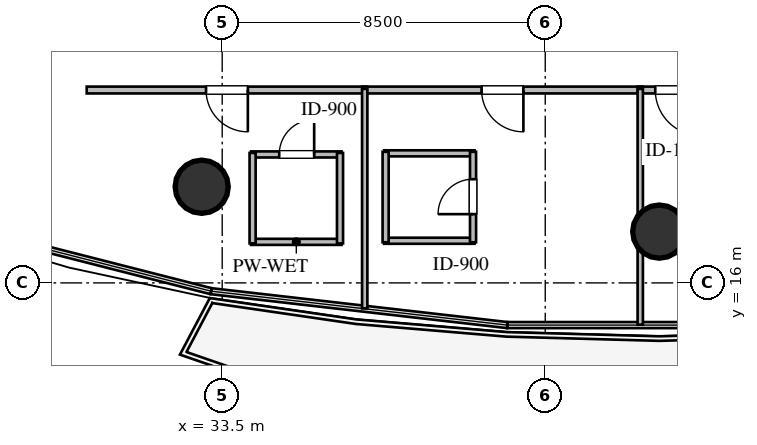
"""IFC4 building model, lengths in metres.
Left out: names, types, materials, properties, quantities, classifications, styles, units other than length and angle.
Written with IfcOpenShell. Run it as: python <this file> out.ifc"""

import sys

from ifc_helpers import new_model, si_unit, direction, frame, frame_2d, origin, origin_2d, place, context, subcontext, project, spatial, rectangle, circle, extrude, element, fill, save


model = new_model("IFC4")
c1 = context("Model", 3, precision=1e-05, world=origin(), true_north=direction((0.0, 1.0)))
c2 = subcontext(c1, "Body", "Model", "MODEL_VIEW")
j1 = project(units=[si_unit("LENGTHUNIT", "METRE"), si_unit("PLANEANGLEUNIT", "RADIAN")], contexts=[c1])
p1 = place(None, origin())
s1 = spatial("IfcSite", under=j1, at=p1, CompositionType="ELEMENT")
p2 = place(p1, origin())
s2 = spatial("IfcBuilding", under=s1, at=p2, CompositionType="ELEMENT")
p3 = place(p2, frame((0.0, 0.0, 42.0)))
s3 = spatial("IfcBuildingStorey", under=s2, at=p3, CompositionType="ELEMENT", Elevation=42.0)
for number, where, z_axis, x_axis in (
    (1, (32.96, 18.53, 0.0), (0.0, 0.0, 1.0), (1.0, 0.0, 0.0)),
    (2, (45.0, 17.35, 0.0), (0.0, 0.0, 1.0), (1.0, 0.0, 0.0)),
):
    element("IfcColumn", number, at=place(p3, frame(where, z_axis=z_axis, x_axis=x_axis)), inside=s3, PredefinedType="COLUMN", context=c2, shape_type="SweptSolid", body=[
        extrude(circle(Radius=0.7, at=origin_2d()), origin(), (0.0, 0.0, 1.0), 3.6),
    ])
p4 = place(p3, frame((34.26, 17.08, 0.0), z_axis=(0.0, 0.0, 1.0), x_axis=(1.0, 0.0, 0.0)))
e3 = element("IfcWall", 3, at=p4, inside=s3, PredefinedType="PLUMBINGWALL", context=c2, shape_type="SweptSolid", body=[
    extrude(rectangle(XDim=2.38, YDim=0.16, at=frame_2d((1.19, 0.0))), origin(), (0.0, 0.0, 1.0), 3.36),
])
p5 = place(p3, frame((34.26, 19.38, 0.0), z_axis=(0.0, 0.0, 1.0), x_axis=(1.0, 0.0, 0.0)))
e4 = element("IfcWall", 4, at=p5, inside=s3, PredefinedType="PLUMBINGWALL", context=c2, shape_type="SweptSolid", body=[
    extrude(rectangle(XDim=2.38, YDim=0.16, at=frame_2d((1.19, 0.0))), origin(), (0.0, 0.0, 1.0), 3.36),
])
p6 = place(p5, frame((0.74, 0.0, 0.0)))
e5 = element("IfcOpeningElement", 5, at=p6, cuts=e4, PredefinedType="OPENING", context=c2, shape_type="SweptSolid", body=[
    extrude(rectangle(XDim=0.92, YDim=2.1, at=frame_2d((0.46, 1.05))), frame((0.0, 0.09, 0.0), z_axis=(0.0, -1.0, 0.0), x_axis=(1.0, 0.0, 0.0)), (0.0, 0.0, 1.0), 0.18),
])
for number, where, z_axis, x_axis in (
    (6, (34.3, 17.04, 0.0), (0.0, 0.0, 1.0), (0.0, 1.0, 0.0)),
    (7, (36.6, 17.04, 0.0), (0.0, 0.0, 1.0), (0.0, 1.0, 0.0)),
    (8, (37.76, 17.109, 0.0), (0.0, 0.0, 1.0), (1.0, 0.0, 0.0)),
    (9, (37.76, 19.409, 0.0), (0.0, 0.0, 1.0), (1.0, 0.0, 0.0)),
    (10, (37.8, 17.069, 0.0), (0.0, 0.0, 1.0), (0.0, 1.0, 0.0)),
):
    element("IfcWall", number, at=place(p3, frame(where, z_axis=z_axis, x_axis=x_axis)), inside=s3, PredefinedType="PLUMBINGWALL", context=c2, shape_type="SweptSolid", body=[
        extrude(rectangle(XDim=2.38, YDim=0.16, at=frame_2d((1.19, 0.0))), origin(), (0.0, 0.0, 1.0), 3.36),
    ])
p7 = place(p3, frame((40.1, 17.069, 0.0), z_axis=(0.0, 0.0, 1.0), x_axis=(0.0, 1.0, 0.0)))
e11 = element("IfcWall", 11, at=p7, inside=s3, PredefinedType="PLUMBINGWALL", context=c2, shape_type="SweptSolid", body=[
    extrude(rectangle(XDim=2.38, YDim=0.16, at=frame_2d((1.19, 0.0))), origin(), (0.0, 0.0, 1.0), 3.36),
])
p8 = place(p7, frame((0.74, 0.0, 0.0)))
e12 = element("IfcOpeningElement", 12, at=p8, cuts=e11, PredefinedType="OPENING", context=c2, shape_type="SweptSolid", body=[
    extrude(rectangle(XDim=0.92, YDim=2.1, at=frame_2d((0.46, 1.05))), frame((0.0, 0.09, 0.0), z_axis=(0.0, -1.0, 0.0), x_axis=(1.0, 0.0, 0.0)), (0.0, 0.0, 1.0), 0.18),
])
p9 = place(p3, frame((37.315, 21.075, 0.0), z_axis=(0.0, 0.0, 1.0), x_axis=(-1.0, 0.0, 0.0)))
e13 = element("IfcWall", 13, at=p9, inside=s3, PredefinedType="PARTITIONING", context=c2, shape_type="SweptSolid", body=[
    extrude(rectangle(XDim=7.38, YDim=0.18, at=frame_2d((3.69, 0.0))), origin(), (0.0, 0.0, 1.0), 2.996),
])
p10 = place(p9, frame((3.14, 0.0, 0.0)))
e14 = element("IfcOpeningElement", 14, at=p10, cuts=e13, PredefinedType="OPENING", context=c2, shape_type="SweptSolid", body=[
    extrude(rectangle(XDim=1.1, YDim=2.1, at=frame_2d((0.55, 1.05))), frame((0.0, 0.1, 0.0), z_axis=(0.0, -1.0, 0.0), x_axis=(1.0, 0.0, 0.0)), (0.0, 0.0, 1.0), 0.2),
])
p11 = place(p3, frame((44.565, 21.075, 0.0), z_axis=(0.0, 0.0, 1.0), x_axis=(-1.0, 0.0, 0.0)))
e15 = element("IfcWall", 15, at=p11, inside=s3, PredefinedType="PARTITIONING", context=c2, shape_type="SweptSolid", body=[
    extrude(rectangle(XDim=7.38, YDim=0.18, at=frame_2d((3.69, 0.0))), origin(), (0.0, 0.0, 1.0), 2.996),
])
p12 = place(p11, frame((3.14, 0.0, 0.0)))
e16 = element("IfcOpeningElement", 16, at=p12, cuts=e15, PredefinedType="OPENING", context=c2, shape_type="SweptSolid", body=[
    extrude(rectangle(XDim=1.1, YDim=2.1, at=frame_2d((0.55, 1.05))), frame((0.0, 0.1, 0.0), z_axis=(0.0, -1.0, 0.0), x_axis=(1.0, 0.0, 0.0)), (0.0, 0.0, 1.0), 0.2),
])
p13 = place(p3, frame((46.555, 21.075, 0.0), z_axis=(0.0, 0.0, 1.0), x_axis=(-1.0, 0.0, 0.0)))
e17 = element("IfcWall", 17, at=p13, inside=s3, PredefinedType="PARTITIONING", context=c2, shape_type="SweptSolid", body=[
    extrude(rectangle(XDim=2.12, YDim=0.18, at=frame_2d((1.06, 0.0))), origin(), (0.0, 0.0, 1.0), 3.36),
])
p14 = place(p13, frame((0.46, 0.0, 0.0)))
e18 = element("IfcOpeningElement", 18, at=p14, cuts=e17, PredefinedType="OPENING", context=c2, shape_type="SweptSolid", body=[
    extrude(rectangle(XDim=1.2, YDim=2.15, at=frame_2d((0.6, 1.075))), frame((0.0, 0.1, 0.0), z_axis=(0.0, -1.0, 0.0), x_axis=(1.0, 0.0, 0.0)), (0.0, 0.0, 1.0), 0.2),
])
p15 = place(p3, frame((37.25, 21.105, 0.0), z_axis=(0.0, 0.0, 1.0), x_axis=(0.0, -1.0, 0.0)))
e19 = element("IfcWall", 19, at=p15, inside=s3, PredefinedType="PARTITIONING", context=c2, shape_type="SweptSolid", body=[
    extrude(rectangle(XDim=5.776, YDim=0.14, at=frame_2d((2.888, 0.0))), origin(), (0.0, 0.0, 1.0), 3.36),
])
p16 = place(p3, frame((44.5, 21.105, 0.0), z_axis=(0.0, 0.0, 1.0), x_axis=(0.0, -1.0, 0.0)))
e20 = element("IfcWall", 20, at=p16, inside=s3, PredefinedType="PARTITIONING", context=c2, shape_type="SweptSolid", body=[
    extrude(rectangle(XDim=6.205, YDim=0.14, at=frame_2d((3.103, 0.0))), origin(), (0.0, 0.0, 1.0), 2.806),
])
p17 = place(p6, origin())
e21 = element("IfcDoor", 21, at=p17, inside=s3, OperationType="SINGLE_SWING_RIGHT", PredefinedType="DOOR", context=c2, shape_type="SweptSolid", body=[
    extrude(rectangle(XDim=0.92, YDim=2.1, at=frame_2d((0.46, 1.05))), frame((0.0, 0.025, 0.0), z_axis=(0.0, -1.0, 0.0), x_axis=(1.0, 0.0, 0.0)), (0.0, 0.0, 1.0), 0.05),
])
fill(e5, e21)
p18 = place(p8, origin())
e22 = element("IfcDoor", 22, at=p18, inside=s3, OperationType="SINGLE_SWING_LEFT", PredefinedType="DOOR", context=c2, shape_type="SweptSolid", body=[
    extrude(rectangle(XDim=0.92, YDim=2.1, at=frame_2d((0.46, 1.05))), frame((0.0, 0.025, 0.0), z_axis=(0.0, -1.0, 0.0), x_axis=(1.0, 0.0, 0.0)), (0.0, 0.0, 1.0), 0.05),
])
fill(e12, e22)
p19 = place(p10, origin())
e23 = element("IfcDoor", 23, at=p19, inside=s3, OperationType="SINGLE_SWING_LEFT", PredefinedType="DOOR", context=c2, shape_type="SweptSolid", body=[
    extrude(rectangle(XDim=1.1, YDim=2.1, at=frame_2d((0.55, 1.05))), frame((0.0, 0.025, 0.0), z_axis=(0.0, -1.0, 0.0), x_axis=(1.0, 0.0, 0.0)), (0.0, 0.0, 1.0), 0.05),
])
fill(e14, e23)
p20 = place(p12, origin())
e24 = element("IfcDoor", 24, at=p20, inside=s3, OperationType="SINGLE_SWING_LEFT", PredefinedType="DOOR", context=c2, shape_type="SweptSolid", body=[
    extrude(rectangle(XDim=1.1, YDim=2.1, at=frame_2d((0.55, 1.05))), frame((0.0, 0.025, 0.0), z_axis=(0.0, -1.0, 0.0), x_axis=(1.0, 0.0, 0.0)), (0.0, 0.0, 1.0), 0.05),
])
fill(e16, e24)
p21 = place(p14, origin())
e25 = element("IfcDoor", 25, at=p21, inside=s3, OperationType="SINGLE_SWING_LEFT", PredefinedType="DOOR", context=c2, shape_type="SweptSolid", body=[
    extrude(rectangle(XDim=1.2, YDim=2.15, at=frame_2d((0.6, 1.075))), frame((0.0, 0.025, 0.0), z_axis=(0.0, -1.0, 0.0), x_axis=(1.0, 0.0, 0.0)), (0.0, 0.0, 1.0), 0.05),
])
fill(e18, e25)
save(model, sys.argv[1])
